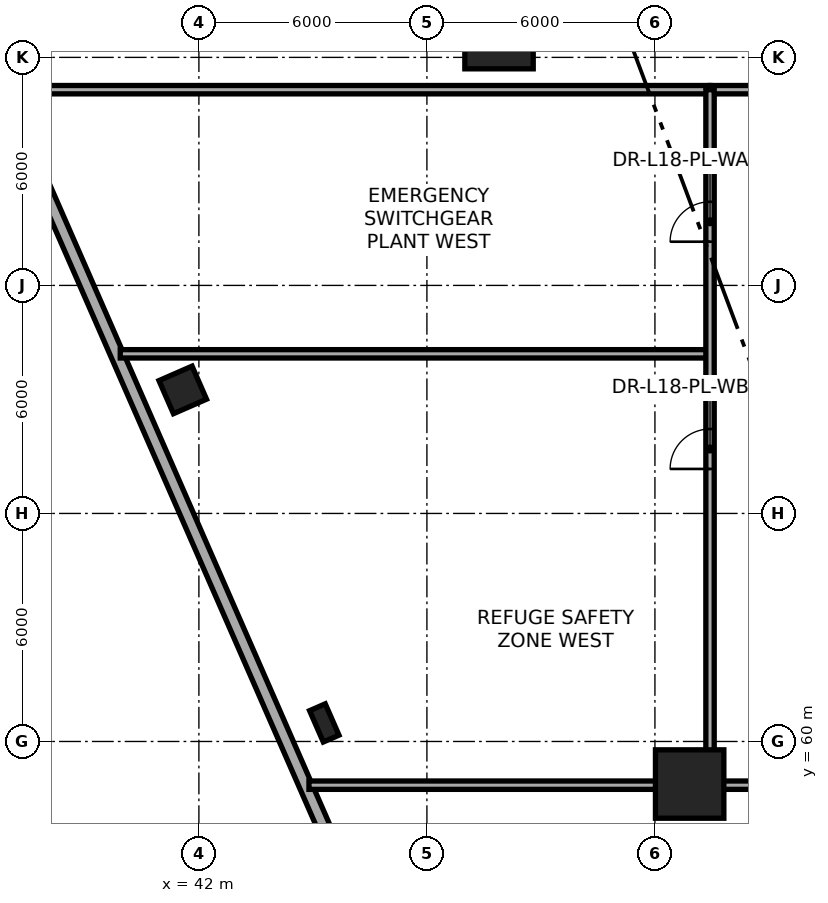
"""IFC4 building model, lengths in metres.
Left out: names, types, materials, properties, quantities, classifications, styles, units other than length and angle.
Written with IfcOpenShell. Run it as: python <this file> out.ifc"""

import sys

from ifc_helpers import new_model, si_unit, direction, frame, frame_2d, origin, origin_2d, place, context, subcontext, project, spatial, rectangle, extrude, element, fill, save


model = new_model("IFC4")
c1 = context("Model", 3, precision=1e-05, world=origin(), true_north=direction((0.0, 1.0)))
c2 = subcontext(c1, "Body", "Model", "MODEL_VIEW")
j1 = project(units=[si_unit("LENGTHUNIT", "METRE"), si_unit("PLANEANGLEUNIT", "RADIAN")], contexts=[c1])
p1 = place(None, origin())
s1 = spatial("IfcSite", under=j1, at=p1, CompositionType="ELEMENT")
p2 = place(p1, origin())
s2 = spatial("IfcBuilding", under=s1, at=p2, CompositionType="ELEMENT")
p3 = place(p2, frame((0.0, 0.0, 70.8)))
s3 = spatial("IfcBuildingStorey", under=s2, at=p3, CompositionType="ELEMENT", Elevation=70.8)
for number, where, z_axis, x_axis in (
    (1, (49.898, 78.599, 0.0), (0.0, 0.0, 1.0), (1.0, 0.0, 0.0)),
    (2, (54.914, 58.88, 0.0), (0.0, 0.0, 1.0), (1.0, 0.0, 0.0)),
):
    element("IfcColumn", number, at=place(p3, frame(where, z_axis=z_axis, x_axis=x_axis)), inside=s3, PredefinedType="COLUMN", context=c2, shape_type="SweptSolid", body=[
        extrude(rectangle(XDim=1.8, YDim=1.8, at=origin_2d()), origin(), (0.0, 0.0, 1.0), 4.2),
    ])
p4 = place(p3, frame((41.504, 69.261, 0.003), z_axis=(0.034091159892, -0.005003139506, 0.99940620441), x_axis=(0.964106610004, 0.263632228909, -0.03156726828)))
e3 = element("IfcColumn", 3, at=p4, inside=s3, PredefinedType="COLUMN", context=c2, shape_type="SweptSolid", body=[
    extrude(rectangle(XDim=0.95, YDim=0.95, at=origin_2d()), origin(), (0.0, 0.0, 1.0), 4.197),
])
p5 = place(p3, frame((45.241, 60.469, 0.003), z_axis=(0.027812744233, 0.00913514821, 0.999571408317), x_axis=(0.744953289823, 0.666577291136, -0.026819972481)))
e4 = element("IfcColumn", 4, at=p5, inside=s3, PredefinedType="PILASTER", context=c2, shape_type="SweptSolid", body=[
    extrude(rectangle(XDim=0.9, YDim=0.45, at=origin_2d()), origin(), (0.0, 0.0, 1.0), 4.196),
])
p6 = place(p3, frame((61.236, 21.291, 0.0), z_axis=(0.0, 0.0, 1.0), x_axis=(-0.400832536075, 0.916151340131, 0.0)))
e5 = element("IfcWall", 5, at=p6, inside=s3, PredefinedType="STANDARD", context=c2, shape_type="SweptSolid", body=[
    extrude(rectangle(XDim=68.233, YDim=0.34, at=frame_2d((34.117, 0.0))), origin(), (0.0, 0.0, 1.0), 0.85),
])
p7 = place(p3, frame((36.889, 77.15, 0.0), z_axis=(0.0, 0.0, 1.0), x_axis=(1.0, 0.0, 0.0)))
e6 = element("IfcWall", 6, at=p7, inside=s3, PredefinedType="PARTITIONING", context=c2, shape_type="SweptSolid", body=[
    extrude(rectangle(XDim=18.561, YDim=0.22, at=frame_2d((9.28, 0.0))), origin(), (0.0, 0.0, 1.0), 3.055),
])
p8 = place(p3, frame((39.93, 70.2, 0.0), z_axis=(0.0, 0.0, 1.0), x_axis=(1.0, 0.0, 0.0)))
e7 = element("IfcWall", 7, at=p8, inside=s3, PredefinedType="PARTITIONING", context=c2, shape_type="SweptSolid", body=[
    extrude(rectangle(XDim=15.52, YDim=0.22, at=frame_2d((7.76, 0.0))), origin(), (0.0, 0.0, 1.0), 3.055),
])
p9 = place(p3, frame((44.896, 58.85, 0.0), z_axis=(0.0, 0.0, 1.0), x_axis=(1.0, 0.0, 0.0)))
e8 = element("IfcWall", 8, at=p9, inside=s3, PredefinedType="PARTITIONING", context=c2, shape_type="SweptSolid", body=[
    extrude(rectangle(XDim=10.554, YDim=0.22, at=frame_2d((5.277, 0.0))), origin(), (0.0, 0.0, 1.0), 3.055),
])
p10 = place(p3, frame((55.45, 58.85, 0.0), z_axis=(0.0, 0.0, 1.0), x_axis=(1.0, 0.0, 0.0)))
e9 = element("IfcWall", 9, at=p10, inside=s3, PredefinedType="PARTITIONING", context=c2, shape_type="SweptSolid", body=[
    extrude(rectangle(XDim=21.1, YDim=0.22, at=frame_2d((10.55, 0.0))), origin(), (0.0, 0.0, 1.0), 3.205),
])
p11 = place(p10, frame((9.8, 0.0, 0.0)))
e10 = element("IfcOpeningElement", 10, at=p11, cuts=e9, PredefinedType="OPENING", context=c2, shape_type="SweptSolid", body=[
    extrude(rectangle(XDim=1.5, YDim=2.2, at=frame_2d((0.75, 1.1))), frame((0.0, 0.12, 0.0), z_axis=(0.0, -1.0, 0.0), x_axis=(1.0, 0.0, 0.0)), (0.0, 0.0, 1.0), 0.24),
])
p12 = place(p3, frame((55.45, 77.15, 0.0), z_axis=(0.0, 0.0, 1.0), x_axis=(1.0, 0.0, 0.0)))
e11 = element("IfcWall", 11, at=p12, inside=s3, PredefinedType="PARTITIONING", context=c2, shape_type="SweptSolid", body=[
    extrude(rectangle(XDim=21.1, YDim=0.22, at=frame_2d((10.55, 0.0))), origin(), (0.0, 0.0, 1.0), 3.205),
])
p13 = place(p12, frame((1.25, 0.0, 0.0)))
e12 = element("IfcOpeningElement", 12, at=p13, cuts=e11, PredefinedType="OPENING", context=c2, shape_type="SweptSolid", body=[
    extrude(rectangle(XDim=1.05, YDim=2.15, at=frame_2d((0.525, 1.075))), frame((0.0, 0.12, 0.0), z_axis=(0.0, -1.0, 0.0), x_axis=(1.0, 0.0, 0.0)), (0.0, 0.0, 1.0), 0.24),
])
p14 = place(p12, frame((6.525, 0.0, 0.0)))
e13 = element("IfcOpeningElement", 13, at=p14, cuts=e11, PredefinedType="OPENING", context=c2, shape_type="SweptSolid", body=[
    extrude(rectangle(XDim=1.05, YDim=2.15, at=frame_2d((0.525, 1.075))), frame((0.0, 0.12, 0.0), z_axis=(0.0, -1.0, 0.0), x_axis=(1.0, 0.0, 0.0)), (0.0, 0.0, 1.0), 0.24),
])
p15 = place(p12, frame((11.801, 0.0, 0.0)))
e14 = element("IfcOpeningElement", 14, at=p15, cuts=e11, PredefinedType="OPENING", context=c2, shape_type="SweptSolid", body=[
    extrude(rectangle(XDim=1.05, YDim=2.15, at=frame_2d((0.525, 1.075))), frame((0.0, 0.12, 0.0), z_axis=(0.0, -1.0, 0.0), x_axis=(1.0, 0.0, 0.0)), (0.0, 0.0, 1.0), 0.24),
])
p16 = place(p12, frame((18.9, 0.0, 0.0)))
e15 = element("IfcOpeningElement", 15, at=p16, cuts=e11, PredefinedType="OPENING", context=c2, shape_type="SweptSolid", body=[
    extrude(rectangle(XDim=1.05, YDim=2.15, at=frame_2d((0.525, 1.075))), frame((0.0, 0.12, 0.0), z_axis=(0.0, -1.0, 0.0), x_axis=(1.0, 0.0, 0.0)), (0.0, 0.0, 1.0), 0.24),
])
p17 = place(p3, frame((55.45, 58.85, 0.0), z_axis=(0.0, 0.0, 1.0), x_axis=(0.0, 1.0, 0.0)))
e16 = element("IfcWall", 16, at=p17, inside=s3, PredefinedType="PARTITIONING", context=c2, shape_type="SweptSolid", body=[
    extrude(rectangle(XDim=18.3, YDim=0.22, at=frame_2d((9.15, 0.0))), origin(), (0.0, 0.0, 1.0), 3.205),
])
p18 = place(p17, frame((8.321, 0.0, 0.0)))
e17 = element("IfcOpeningElement", 17, at=p18, cuts=e16, PredefinedType="OPENING", context=c2, shape_type="SweptSolid", body=[
    extrude(rectangle(XDim=1.05, YDim=2.15, at=frame_2d((0.525, 1.075))), frame((0.0, 0.12, 0.0), z_axis=(0.0, -1.0, 0.0), x_axis=(1.0, 0.0, 0.0)), (0.0, 0.0, 1.0), 0.24),
])
p19 = place(p17, frame((14.3, 0.0, 0.0)))
e18 = element("IfcOpeningElement", 18, at=p19, cuts=e16, PredefinedType="OPENING", context=c2, shape_type="SweptSolid", body=[
    extrude(rectangle(XDim=1.05, YDim=2.15, at=frame_2d((0.525, 1.075))), frame((0.0, 0.12, 0.0), z_axis=(0.0, -1.0, 0.0), x_axis=(1.0, 0.0, 0.0)), (0.0, 0.0, 1.0), 0.24),
])
p20 = place(p18, origin())
e19 = element("IfcDoor", 19, at=p20, inside=s3, OperationType="SINGLE_SWING_LEFT", PredefinedType="DOOR", context=c2, shape_type="SweptSolid", body=[
    extrude(rectangle(XDim=1.05, YDim=2.15, at=frame_2d((0.525, 1.075))), frame((0.0, 0.025, 0.0), z_axis=(0.0, -1.0, 0.0), x_axis=(1.0, 0.0, 0.0)), (0.0, 0.0, 1.0), 0.05),
])
fill(e17, e19)
p21 = place(p19, origin())
e20 = element("IfcDoor", 20, at=p21, inside=s3, OperationType="SINGLE_SWING_LEFT", PredefinedType="DOOR", context=c2, shape_type="SweptSolid", body=[
    extrude(rectangle(XDim=1.05, YDim=2.15, at=frame_2d((0.525, 1.075))), frame((0.0, 0.025, 0.0), z_axis=(0.0, -1.0, 0.0), x_axis=(1.0, 0.0, 0.0)), (0.0, 0.0, 1.0), 0.05),
])
fill(e18, e20)
save(model, sys.argv[1])
